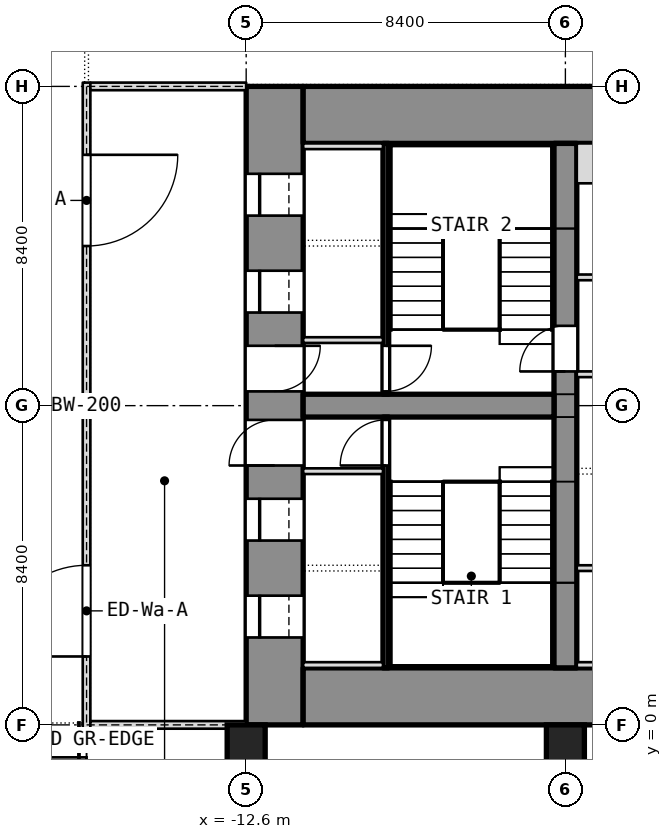
"""IFC4 building model, lengths in metres.
Left out: names, types, materials, properties, quantities, classifications, styles, units other than length and angle.
Written with IfcOpenShell. Run it as: python <this file> out.ifc"""

import sys

from ifc_helpers import new_model, si_unit, direction, frame, frame_2d, origin, origin_2d, place, context, subcontext, project, spatial, rectangle, extrude, element, fill, save


model = new_model("IFC4")
c1 = context("Model", 3, precision=1e-05, world=origin(), true_north=direction((0.0, 1.0)))
c2 = subcontext(c1, "Body", "Model", "MODEL_VIEW")
j1 = project(units=[si_unit("LENGTHUNIT", "METRE"), si_unit("PLANEANGLEUNIT", "RADIAN")], contexts=[c1])
p1 = place(None, origin())
s1 = spatial("IfcSite", under=j1, at=p1, CompositionType="ELEMENT")
p2 = place(p1, origin())
s2 = spatial("IfcBuilding", under=s1, at=p2, CompositionType="ELEMENT")
p3 = place(p2, frame((0.0, 0.0, 26.0)))
s3 = spatial("IfcBuildingStorey", under=s2, at=p3, CompositionType="ELEMENT", Elevation=26.0)
p4 = place(p3, frame((-11.85, 0.0, 0.0), z_axis=(0.0, 0.0, 1.0), x_axis=(0.0, 1.0, 0.0)))
e1 = element("IfcWall", 1, at=p4, inside=s3, PredefinedType="SHEAR", context=c2, shape_type="SweptSolid", body=[
    extrude(rectangle(XDim=16.8, YDim=1.5, at=frame_2d((8.4, 0.0))), origin(), (0.0, 0.0, 1.0), 5.0),
])
p5 = place(p4, frame((2.3, 0.0, 0.0)))
e2 = element("IfcOpeningElement", 2, at=p5, cuts=e1, PredefinedType="OPENING", context=c2, shape_type="SweptSolid", body=[
    extrude(rectangle(XDim=1.1, YDim=2.1, at=frame_2d((0.55, 1.05))), frame((0.0, 0.75, 0.0), z_axis=(0.0, -1.0, 0.0), x_axis=(1.0, 0.0, 0.0)), (0.0, 0.0, 1.0), 1.5),
])
p6 = place(p4, frame((4.85, 0.0, 0.0)))
e3 = element("IfcOpeningElement", 3, at=p6, cuts=e1, PredefinedType="OPENING", context=c2, shape_type="SweptSolid", body=[
    extrude(rectangle(XDim=1.1, YDim=2.1, at=frame_2d((0.55, 1.05))), frame((0.0, 0.75, 0.0), z_axis=(0.0, -1.0, 0.0), x_axis=(1.0, 0.0, 0.0)), (0.0, 0.0, 1.0), 1.5),
])
p7 = place(p4, frame((6.825, 0.0, 0.0)))
e4 = element("IfcOpeningElement", 4, at=p7, cuts=e1, PredefinedType="OPENING", context=c2, shape_type="SweptSolid", body=[
    extrude(rectangle(XDim=1.2, YDim=2.1, at=frame_2d((0.6, 1.05))), frame((0.0, 0.75, 0.0), z_axis=(0.0, -1.0, 0.0), x_axis=(1.0, 0.0, 0.0)), (0.0, 0.0, 1.0), 1.5),
])
p8 = place(p4, frame((13.4, 0.0, 0.0)))
e5 = element("IfcOpeningElement", 5, at=p8, cuts=e1, PredefinedType="OPENING", context=c2, shape_type="SweptSolid", body=[
    extrude(rectangle(XDim=1.1, YDim=2.1, at=frame_2d((0.55, 1.05))), frame((0.0, 0.75, 0.0), z_axis=(0.0, -1.0, 0.0), x_axis=(1.0, 0.0, 0.0)), (0.0, 0.0, 1.0), 1.5),
])
p9 = place(p4, frame((10.85, 0.0, 0.0)))
e6 = element("IfcOpeningElement", 6, at=p9, cuts=e1, PredefinedType="OPENING", context=c2, shape_type="SweptSolid", body=[
    extrude(rectangle(XDim=1.1, YDim=2.1, at=frame_2d((0.55, 1.05))), frame((0.0, 0.75, 0.0), z_axis=(0.0, -1.0, 0.0), x_axis=(1.0, 0.0, 0.0)), (0.0, 0.0, 1.0), 1.5),
])
p10 = place(p4, frame((8.775, 0.0, 0.0)))
e7 = element("IfcOpeningElement", 7, at=p10, cuts=e1, PredefinedType="OPENING", context=c2, shape_type="SweptSolid", body=[
    extrude(rectangle(XDim=1.2, YDim=2.1, at=frame_2d((0.6, 1.05))), frame((0.0, 0.75, 0.0), z_axis=(0.0, -1.0, 0.0), x_axis=(1.0, 0.0, 0.0)), (0.0, 0.0, 1.0), 1.5),
])
for number, where, z_axis, x_axis in (
    (8, (-11.1, 0.75, 0.0), (0.0, 0.0, 1.0), (1.0, 0.0, 0.0)),
    (9, (-11.1, 16.05, 0.0), (0.0, 0.0, 1.0), (1.0, 0.0, 0.0)),
):
    element("IfcWall", number, at=place(p3, frame(where, z_axis=z_axis, x_axis=x_axis)), inside=s3, PredefinedType="SHEAR", context=c2, shape_type="SweptSolid", body=[
        extrude(rectangle(XDim=22.2, YDim=1.5, at=frame_2d((11.1, 0.0))), origin(), (0.0, 0.0, 1.0), 5.0),
    ])
p11 = place(p3, frame((-4.2, 1.5, 0.0), z_axis=(0.0, 0.0, 1.0), x_axis=(0.0, 1.0, 0.0)))
e10 = element("IfcWall", 10, at=p11, inside=s3, PredefinedType="SHEAR", context=c2, shape_type="SweptSolid", body=[
    extrude(rectangle(XDim=13.8, YDim=0.6, at=frame_2d((6.9, 0.0))), origin(), (0.0, 0.0, 1.0), 5.0),
])
p12 = place(p11, frame((7.8, 0.0, 0.0)))
e11 = element("IfcOpeningElement", 11, at=p12, cuts=e10, PredefinedType="OPENING", context=c2, shape_type="SweptSolid", body=[
    extrude(rectangle(XDim=1.2, YDim=2.1, at=frame_2d((0.6, 1.05))), frame((0.0, 0.3, 0.0), z_axis=(0.0, -1.0, 0.0), x_axis=(1.0, 0.0, 0.0)), (0.0, 0.0, 1.0), 0.6),
])
p13 = place(p3, frame((-11.1, 8.4, 0.0), z_axis=(0.0, 0.0, 1.0), x_axis=(1.0, 0.0, 0.0)))
e12 = element("IfcWall", 12, at=p13, inside=s3, PredefinedType="SHEAR", context=c2, shape_type="SweptSolid", body=[
    extrude(rectangle(XDim=6.6, YDim=0.6, at=frame_2d((3.3, 0.0))), origin(), (0.0, 0.0, 1.0), 5.0),
])
for number, where, z_axis, x_axis in (
    (13, (-12.6, -0.5, 0.0), (0.0, 0.0, 1.0), (1.0, 0.0, 0.0)),
    (14, (-4.2, -0.5, 0.0), (0.0, 0.0, 1.0), (1.0, 0.0, 0.0)),
):
    element("IfcColumn", number, at=place(p3, frame(where, z_axis=z_axis, x_axis=x_axis)), inside=s3, PredefinedType="COLUMN", context=c2, shape_type="SweptSolid", body=[
        extrude(rectangle(XDim=1.0, YDim=1.0, at=origin_2d()), origin(), (0.0, 0.0, 1.0), 5.0),
    ])
p14 = place(p3, frame((-8.925, 1.5, 0.0), z_axis=(0.0, 0.0, 1.0), x_axis=(0.0, 1.0, 0.0)))
e15 = element("IfcWall", 15, at=p14, inside=s3, PredefinedType="SHEAR", context=c2, shape_type="SweptSolid", body=[
    extrude(rectangle(XDim=6.6, YDim=0.15, at=frame_2d((3.3, 0.0))), origin(), (0.0, 0.0, 1.0), 4.8),
])
p15 = place(p14, frame((5.325, 0.0, 0.0)))
e16 = element("IfcOpeningElement", 16, at=p15, cuts=e15, PredefinedType="OPENING", context=c2, shape_type="SweptSolid", body=[
    extrude(rectangle(XDim=1.2, YDim=2.1, at=frame_2d((0.6, 1.05))), frame((0.0, 0.075, 0.0), z_axis=(0.0, -1.0, 0.0), x_axis=(1.0, 0.0, 0.0)), (0.0, 0.0, 1.0), 0.15),
])
for number, where, z_axis, x_axis in (
    (17, (-11.1, 6.675, 0.0), (0.0, 0.0, 1.0), (1.0, 0.0, 0.0)),
    (18, (-11.1, 1.575, 0.0), (0.0, 0.0, 1.0), (1.0, 0.0, 0.0)),
):
    element("IfcWall", number, at=place(p3, frame(where, z_axis=z_axis, x_axis=x_axis)), inside=s3, PredefinedType="SHEAR", context=c2, shape_type="SweptSolid", body=[
        extrude(rectangle(XDim=2.1, YDim=0.15, at=frame_2d((1.05, 0.0))), origin(), (0.0, 0.0, 1.0), 5.0),
    ])
p16 = place(p3, frame((-8.925, 8.7, 0.0), z_axis=(0.0, 0.0, 1.0), x_axis=(0.0, 1.0, 0.0)))
e19 = element("IfcWall", 19, at=p16, inside=s3, PredefinedType="SHEAR", context=c2, shape_type="SweptSolid", body=[
    extrude(rectangle(XDim=6.6, YDim=0.15, at=frame_2d((3.3, 0.0))), origin(), (0.0, 0.0, 1.0), 4.8),
])
p17 = place(p16, frame((0.075, 0.0, 0.0)))
e20 = element("IfcOpeningElement", 20, at=p17, cuts=e19, PredefinedType="OPENING", context=c2, shape_type="SweptSolid", body=[
    extrude(rectangle(XDim=1.2, YDim=2.1, at=frame_2d((0.6, 1.05))), frame((0.0, 0.075, 0.0), z_axis=(0.0, -1.0, 0.0), x_axis=(1.0, 0.0, 0.0)), (0.0, 0.0, 1.0), 0.15),
])
for number, where, z_axis, x_axis in (
    (21, (-11.1, 10.125, 0.0), (0.0, 0.0, 1.0), (1.0, 0.0, 0.0)),
    (22, (-11.1, 15.225, 0.0), (0.0, 0.0, 1.0), (1.0, 0.0, 0.0)),
):
    element("IfcWall", number, at=place(p3, frame(where, z_axis=z_axis, x_axis=x_axis)), inside=s3, PredefinedType="SHEAR", context=c2, shape_type="SweptSolid", body=[
        extrude(rectangle(XDim=2.1, YDim=0.15, at=frame_2d((1.05, 0.0))), origin(), (0.0, 0.0, 1.0), 5.0),
    ])
p18 = place(p3, frame((-3.9, 4.125, 0.0), z_axis=(0.0, 0.0, 1.0), x_axis=(1.0, 0.0, 0.0)))
e23 = element("IfcWall", 23, at=p18, inside=s3, PredefinedType="PARTITIONING", context=c2, shape_type="SweptSolid", body=[
    extrude(rectangle(XDim=7.8, YDim=0.15, at=frame_2d((3.9, 0.0))), origin(), (0.0, 0.0, 1.0), 4.8),
])
p19 = place(p18, frame((3.75, 0.0, 0.0)))
e24 = element("IfcOpeningElement", 24, at=p19, cuts=e23, PredefinedType="OPENING", context=c2, shape_type="SweptSolid", body=[
    extrude(rectangle(XDim=1.2, YDim=2.1, at=frame_2d((0.6, 1.05))), frame((0.0, 0.075, 0.0), z_axis=(0.0, -1.0, 0.0), x_axis=(1.0, 0.0, 0.0)), (0.0, 0.0, 1.0), 0.15),
])
p20 = place(p3, frame((-3.9, 11.775, 0.0), z_axis=(0.0, 0.0, 1.0), x_axis=(1.0, 0.0, 0.0)))
e25 = element("IfcWall", 25, at=p20, inside=s3, PredefinedType="PARTITIONING", context=c2, shape_type="SweptSolid", body=[
    extrude(rectangle(XDim=7.8, YDim=0.15, at=frame_2d((3.9, 0.0))), origin(), (0.0, 0.0, 1.0), 4.8),
])
p21 = place(p20, frame((3.3, 0.0, 0.0)))
e26 = element("IfcOpeningElement", 26, at=p21, cuts=e25, PredefinedType="OPENING", context=c2, shape_type="SweptSolid", body=[
    extrude(rectangle(XDim=1.2, YDim=2.1, at=frame_2d((0.6, 1.05))), frame((0.0, 0.075, 0.0), z_axis=(0.0, -1.0, 0.0), x_axis=(1.0, 0.0, 0.0)), (0.0, 0.0, 1.0), 0.15),
])
p22 = place(p3, frame((-3.9, 1.575, 0.0), z_axis=(0.0, 0.0, 1.0), x_axis=(1.0, 0.0, 0.0)))
e27 = element("IfcWall", 27, at=p22, inside=s3, PredefinedType="SHEAR", context=c2, shape_type="SweptSolid", body=[
    extrude(rectangle(XDim=3.0, YDim=0.15, at=frame_2d((1.5, 0.0))), origin(), (0.0, 0.0, 1.0), 5.0),
])
p23 = place(p3, frame((-3.9, 9.225, 0.0), z_axis=(0.0, 0.0, 1.0), x_axis=(1.0, 0.0, 0.0)))
e28 = element("IfcWall", 28, at=p23, inside=s3, PredefinedType="SHEAR", context=c2, shape_type="SweptSolid", body=[
    extrude(rectangle(XDim=2.25, YDim=0.15, at=frame_2d((1.125, 0.0))), origin(), (0.0, 0.0, 1.0), 5.0),
])
p24 = place(p3, frame((-3.9, 14.775, 0.0), z_axis=(0.0, 0.0, 1.0), x_axis=(1.0, 0.0, 0.0)))
e29 = element("IfcWall", 29, at=p24, inside=s3, PredefinedType="PARTITIONING", context=c2, shape_type="SweptSolid", body=[
    extrude(rectangle(XDim=2.25, YDim=1.05, at=frame_2d((1.125, 0.0))), origin(), (0.0, 0.0, 1.0), 4.8),
])
p25 = place(p3, frame((-16.8, -0.1, 0.0), z_axis=(0.0, 0.0, 1.0), x_axis=(0.0, 1.0, 0.0)))
e30 = element("IfcWall", 30, at=p25, inside=s3, PredefinedType="PARTITIONING", context=c2, shape_type="SweptSolid", body=[
    extrude(rectangle(XDim=17.0, YDim=0.2, at=frame_2d((8.5, 0.0))), origin(), (0.0, 0.0, 1.0), 4.8),
])
p26 = place(p25, frame((1.9, 0.0, 0.0)))
e31 = element("IfcOpeningElement", 31, at=p26, cuts=e30, PredefinedType="OPENING", context=c2, shape_type="SweptSolid", body=[
    extrude(rectangle(XDim=2.4, YDim=2.1, at=frame_2d((1.2, 1.05))), frame((0.0, 0.1, 0.0), z_axis=(0.0, -1.0, 0.0), x_axis=(1.0, 0.0, 0.0)), (0.0, 0.0, 1.0), 0.2),
])
p27 = place(p25, frame((12.7, 0.0, 0.0)))
e32 = element("IfcOpeningElement", 32, at=p27, cuts=e30, PredefinedType="OPENING", context=c2, shape_type="SweptSolid", body=[
    extrude(rectangle(XDim=2.4, YDim=2.1, at=frame_2d((1.2, 1.05))), frame((0.0, 0.1, 0.0), z_axis=(0.0, -1.0, 0.0), x_axis=(1.0, 0.0, 0.0)), (0.0, 0.0, 1.0), 0.2),
])
for number, where, z_axis, x_axis in (
    (33, (-16.7, 0.0, 0.0), (0.0, 0.0, 1.0), (1.0, 0.0, 0.0)),
    (34, (-16.7, 16.8, 0.0), (0.0, 0.0, 1.0), (1.0, 0.0, 0.0)),
):
    element("IfcWall", number, at=place(p3, frame(where, z_axis=z_axis, x_axis=x_axis)), inside=s3, PredefinedType="PARTITIONING", context=c2, shape_type="SweptSolid", body=[
        extrude(rectangle(XDim=4.1, YDim=0.2, at=frame_2d((2.05, 0.0))), origin(), (0.0, 0.0, 1.0), 4.8),
    ])
p28 = place(p5, origin())
e35 = element("IfcDoor", 35, at=p28, inside=s3, OperationType="SLIDING_TO_LEFT", PredefinedType="DOOR", context=c2, shape_type="SweptSolid", body=[
    extrude(rectangle(XDim=1.1, YDim=2.1, at=frame_2d((0.55, 1.05))), frame((0.0, 0.025, 0.0), z_axis=(0.0, -1.0, 0.0), x_axis=(1.0, 0.0, 0.0)), (0.0, 0.0, 1.0), 0.05),
])
fill(e2, e35)
p29 = place(p6, origin())
e36 = element("IfcDoor", 36, at=p29, inside=s3, OperationType="SLIDING_TO_LEFT", PredefinedType="DOOR", context=c2, shape_type="SweptSolid", body=[
    extrude(rectangle(XDim=1.1, YDim=2.1, at=frame_2d((0.55, 1.05))), frame((0.0, 0.025, 0.0), z_axis=(0.0, -1.0, 0.0), x_axis=(1.0, 0.0, 0.0)), (0.0, 0.0, 1.0), 0.05),
])
fill(e3, e36)
p30 = place(p7, origin())
e37 = element("IfcDoor", 37, at=p30, inside=s3, OperationType="SINGLE_SWING_LEFT", PredefinedType="DOOR", context=c2, shape_type="SweptSolid", body=[
    extrude(rectangle(XDim=1.2, YDim=2.1, at=frame_2d((0.6, 1.05))), frame((0.0, 0.025, 0.0), z_axis=(0.0, -1.0, 0.0), x_axis=(1.0, 0.0, 0.0)), (0.0, 0.0, 1.0), 0.05),
])
fill(e4, e37)
p31 = place(p15, origin())
e38 = element("IfcDoor", 38, at=p31, inside=s3, OperationType="SINGLE_SWING_LEFT", PredefinedType="DOOR", context=c2, shape_type="SweptSolid", body=[
    extrude(rectangle(XDim=1.2, YDim=2.1, at=frame_2d((0.6, 1.05))), frame((0.0, 0.025, 0.0), z_axis=(0.0, -1.0, 0.0), x_axis=(1.0, 0.0, 0.0)), (0.0, 0.0, 1.0), 0.05),
])
fill(e16, e38)
p32 = place(p8, origin())
e39 = element("IfcDoor", 39, at=p32, inside=s3, OperationType="SLIDING_TO_LEFT", PredefinedType="DOOR", context=c2, shape_type="SweptSolid", body=[
    extrude(rectangle(XDim=1.1, YDim=2.1, at=frame_2d((0.55, 1.05))), frame((0.0, 0.025, 0.0), z_axis=(0.0, -1.0, 0.0), x_axis=(1.0, 0.0, 0.0)), (0.0, 0.0, 1.0), 0.05),
])
fill(e5, e39)
p33 = place(p9, origin())
e40 = element("IfcDoor", 40, at=p33, inside=s3, OperationType="SLIDING_TO_LEFT", PredefinedType="DOOR", context=c2, shape_type="SweptSolid", body=[
    extrude(rectangle(XDim=1.1, YDim=2.1, at=frame_2d((0.55, 1.05))), frame((0.0, 0.025, 0.0), z_axis=(0.0, -1.0, 0.0), x_axis=(1.0, 0.0, 0.0)), (0.0, 0.0, 1.0), 0.05),
])
fill(e6, e40)
p34 = place(p10, origin())
e41 = element("IfcDoor", 41, at=p34, inside=s3, OperationType="SINGLE_SWING_LEFT", PredefinedType="DOOR", context=c2, shape_type="SweptSolid", body=[
    extrude(rectangle(XDim=1.2, YDim=2.1, at=frame_2d((0.6, 1.05))), frame((0.0, 0.025, 0.0), z_axis=(0.0, -1.0, 0.0), x_axis=(1.0, 0.0, 0.0)), (0.0, 0.0, 1.0), 0.05),
])
fill(e7, e41)
p35 = place(p17, origin())
e42 = element("IfcDoor", 42, at=p35, inside=s3, OperationType="SINGLE_SWING_LEFT", PredefinedType="DOOR", context=c2, shape_type="SweptSolid", body=[
    extrude(rectangle(XDim=1.2, YDim=2.1, at=frame_2d((0.6, 1.05))), frame((0.0, 0.025, 0.0), z_axis=(0.0, -1.0, 0.0), x_axis=(1.0, 0.0, 0.0)), (0.0, 0.0, 1.0), 0.05),
])
fill(e20, e42)
p36 = place(p12, origin())
e43 = element("IfcDoor", 43, at=p36, inside=s3, OperationType="SINGLE_SWING_LEFT", PredefinedType="DOOR", context=c2, shape_type="SweptSolid", body=[
    extrude(rectangle(XDim=1.2, YDim=2.1, at=frame_2d((0.6, 1.05))), frame((0.0, 0.025, 0.0), z_axis=(0.0, -1.0, 0.0), x_axis=(1.0, 0.0, 0.0)), (0.0, 0.0, 1.0), 0.05),
])
fill(e11, e43)
p37 = place(p26, origin())
e44 = element("IfcDoor", 44, at=p37, inside=s3, OperationType="DOUBLE_DOOR_SINGLE_SWING", PredefinedType="DOOR", context=c2, shape_type="SweptSolid", body=[
    extrude(rectangle(XDim=2.4, YDim=2.1, at=frame_2d((1.2, 1.05))), frame((0.0, 0.025, 0.0), z_axis=(0.0, -1.0, 0.0), x_axis=(1.0, 0.0, 0.0)), (0.0, 0.0, 1.0), 0.05),
])
fill(e31, e44)
p38 = place(p27, origin())
e45 = element("IfcDoor", 45, at=p38, inside=s3, OperationType="DOUBLE_DOOR_SINGLE_SWING", PredefinedType="DOOR", context=c2, shape_type="SweptSolid", body=[
    extrude(rectangle(XDim=2.4, YDim=2.1, at=frame_2d((1.2, 1.05))), frame((0.0, 0.025, 0.0), z_axis=(0.0, -1.0, 0.0), x_axis=(1.0, 0.0, 0.0)), (0.0, 0.0, 1.0), 0.05),
])
fill(e32, e45)
save(model, sys.argv[1])
